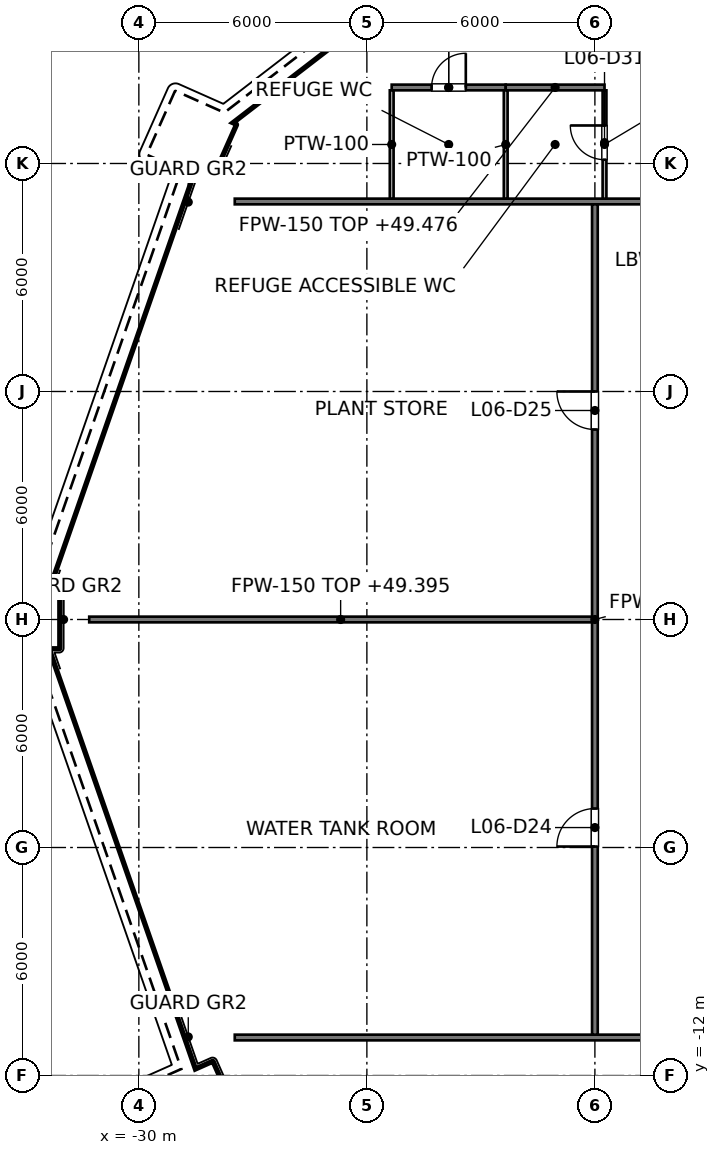
"""IFC4 building model, lengths in metres.
Left out: names, types, materials, properties, quantities, classifications, styles, units other than length and angle.
Written with IfcOpenShell. Run it as: python <this file> out.ifc"""

import sys

from ifc_helpers import new_model, si_unit, direction, frame, frame_2d, origin, place, context, subcontext, project, spatial, rectangle, extrude, element, fill, save


model = new_model("IFC4")
c1 = context("Model", 3, precision=1e-05, world=origin(), true_north=direction((0.0, 1.0)))
c2 = subcontext(c1, "Body", "Model", "MODEL_VIEW")
j1 = project(units=[si_unit("LENGTHUNIT", "METRE"), si_unit("PLANEANGLEUNIT", "RADIAN")], contexts=[c1])
p1 = place(None, origin())
s1 = spatial("IfcSite", under=j1, at=p1, CompositionType="ELEMENT")
p2 = place(p1, origin())
s2 = spatial("IfcBuilding", under=s1, at=p2, CompositionType="ELEMENT")
p3 = place(p2, frame((0.0, 0.0, 44.0)))
s3 = spatial("IfcBuildingStorey", under=s2, at=p3, CompositionType="ELEMENT", Elevation=44.0)
p4 = place(p3, frame((-27.476, 11.0, 0.0), z_axis=(0.0, 0.0, 1.0), x_axis=(1.0, 0.0, 0.0)))
e1 = element("IfcWall", 1, at=p4, inside=s3, PredefinedType="PARTITIONING", context=c2, shape_type="SweptSolid", body=[
    extrude(rectangle(XDim=54.953, YDim=0.15, at=frame_2d((27.476, 0.0))), origin(), (0.0, 0.0, 1.0), 5.327),
])
p5 = place(p4, frame((16.2, 0.0, 0.0)))
e2 = element("IfcOpeningElement", 2, at=p5, cuts=e1, PredefinedType="OPENING", context=c2, shape_type="SweptSolid", body=[
    extrude(rectangle(XDim=1.8, YDim=2.1, at=frame_2d((0.9, 1.05))), frame((0.0, 0.075, 0.0), z_axis=(0.0, -1.0, 0.0), x_axis=(1.0, 0.0, 0.0)), (0.0, 0.0, 1.0), 0.15),
])
p6 = place(p4, frame((23.8, 0.0, 0.0)))
e3 = element("IfcOpeningElement", 3, at=p6, cuts=e1, PredefinedType="OPENING", context=c2, shape_type="SweptSolid", body=[
    extrude(rectangle(XDim=1.8, YDim=2.1, at=frame_2d((0.9, 1.05))), frame((0.0, 0.075, 0.0), z_axis=(0.0, -1.0, 0.0), x_axis=(1.0, 0.0, 0.0)), (0.0, 0.0, 1.0), 0.15),
])
p7 = place(p4, frame((36.55, 0.0, 0.0)))
e4 = element("IfcOpeningElement", 4, at=p7, cuts=e1, PredefinedType="OPENING", context=c2, shape_type="SweptSolid", body=[
    extrude(rectangle(XDim=1.8, YDim=2.1, at=frame_2d((0.9, 1.05))), frame((0.0, 0.075, 0.0), z_axis=(0.0, -1.0, 0.0), x_axis=(1.0, 0.0, 0.0)), (0.0, 0.0, 1.0), 0.15),
])
p8 = place(p3, frame((-27.476, -11.0, 0.0), z_axis=(0.0, 0.0, 1.0), x_axis=(1.0, 0.0, 0.0)))
e5 = element("IfcWall", 5, at=p8, inside=s3, PredefinedType="PARTITIONING", context=c2, shape_type="SweptSolid", body=[
    extrude(rectangle(XDim=54.953, YDim=0.15, at=frame_2d((27.476, 0.0))), origin(), (0.0, 0.0, 1.0), 5.327),
])
p9 = place(p8, frame((27.9, 0.0, 0.0)))
e6 = element("IfcOpeningElement", 6, at=p9, cuts=e5, PredefinedType="OPENING", context=c2, shape_type="SweptSolid", body=[
    extrude(rectangle(XDim=1.0, YDim=2.1, at=frame_2d((0.5, 1.05))), frame((0.0, 0.075, 0.0), z_axis=(0.0, -1.0, 0.0), x_axis=(1.0, 0.0, 0.0)), (0.0, 0.0, 1.0), 0.15),
])
p10 = place(p8, frame((36.35, 0.0, 0.0)))
e7 = element("IfcOpeningElement", 7, at=p10, cuts=e5, PredefinedType="OPENING", context=c2, shape_type="SweptSolid", body=[
    extrude(rectangle(XDim=1.0, YDim=2.1, at=frame_2d((0.5, 1.05))), frame((0.0, 0.075, 0.0), z_axis=(0.0, -1.0, 0.0), x_axis=(1.0, 0.0, 0.0)), (0.0, 0.0, 1.0), 0.15),
])
p11 = place(p8, frame((43.55, 0.0, 0.0)))
e8 = element("IfcOpeningElement", 8, at=p11, cuts=e5, PredefinedType="OPENING", context=c2, shape_type="SweptSolid", body=[
    extrude(rectangle(XDim=1.0, YDim=2.1, at=frame_2d((0.5, 1.05))), frame((0.0, 0.075, 0.0), z_axis=(0.0, -1.0, 0.0), x_axis=(1.0, 0.0, 0.0)), (0.0, 0.0, 1.0), 0.15),
])
p12 = place(p8, frame((16.65, 0.0, 0.0)))
e9 = element("IfcOpeningElement", 9, at=p12, cuts=e5, PredefinedType="OPENING", context=c2, shape_type="SweptSolid", body=[
    extrude(rectangle(XDim=1.8, YDim=2.1, at=frame_2d((0.9, 1.05))), frame((0.0, 0.075, 0.0), z_axis=(0.0, -1.0, 0.0), x_axis=(1.0, 0.0, 0.0)), (0.0, 0.0, 1.0), 0.15),
])
p13 = place(p3, frame((-18.0, -10.925, 0.0), z_axis=(0.0, 0.0, 1.0), x_axis=(0.0, 1.0, 0.0)))
e10 = element("IfcWall", 10, at=p13, inside=s3, PredefinedType="PARTITIONING", context=c2, shape_type="SweptSolid", body=[
    extrude(rectangle(XDim=21.85, YDim=0.15, at=frame_2d((10.925, 0.0))), origin(), (0.0, 0.0, 1.0), 5.327),
])
p14 = place(p13, frame((4.95, 0.0, 0.0)))
e11 = element("IfcOpeningElement", 11, at=p14, cuts=e10, PredefinedType="OPENING", context=c2, shape_type="SweptSolid", body=[
    extrude(rectangle(XDim=1.0, YDim=2.1, at=frame_2d((0.5, 1.05))), frame((0.0, 0.075, 0.0), z_axis=(0.0, -1.0, 0.0), x_axis=(1.0, 0.0, 0.0)), (0.0, 0.0, 1.0), 0.15),
])
p15 = place(p13, frame((15.925, 0.0, 0.0)))
e12 = element("IfcOpeningElement", 12, at=p15, cuts=e10, PredefinedType="OPENING", context=c2, shape_type="SweptSolid", body=[
    extrude(rectangle(XDim=1.0, YDim=2.1, at=frame_2d((0.5, 1.05))), frame((0.0, 0.075, 0.0), z_axis=(0.0, -1.0, 0.0), x_axis=(1.0, 0.0, 0.0)), (0.0, 0.0, 1.0), 0.15),
])
p16 = place(p3, frame((-18.075, 0.0, 0.0), z_axis=(0.0, 0.0, 1.0), x_axis=(-1.0, 0.0, 0.0)))
e13 = element("IfcWall", 13, at=p16, inside=s3, PredefinedType="PARTITIONING", context=c2, shape_type="SweptSolid", body=[
    extrude(rectangle(XDim=13.231, YDim=0.15, at=frame_2d((6.615, 0.0))), origin(), (0.0, 0.0, 1.0), 5.395),
])
p17 = place(p3, frame((-23.347, 14.0, 0.0), z_axis=(0.0, 0.0, 1.0), x_axis=(1.0, 0.0, 0.0)))
e14 = element("IfcWall", 14, at=p17, inside=s3, PredefinedType="PARTITIONING", context=c2, shape_type="SweptSolid", body=[
    extrude(rectangle(XDim=3.0, YDim=0.15, at=frame_2d((1.5, 0.0))), origin(), (0.0, 0.0, 1.0), 6.25),
])
p18 = place(p17, frame((1.05, 0.0, 0.0)))
e15 = element("IfcOpeningElement", 15, at=p18, cuts=e14, PredefinedType="OPENING", context=c2, shape_type="SweptSolid", body=[
    extrude(rectangle(XDim=0.9, YDim=2.1, at=frame_2d((0.45, 1.05))), frame((0.0, 0.075, 0.0), z_axis=(0.0, -1.0, 0.0), x_axis=(1.0, 0.0, 0.0)), (0.0, 0.0, 1.0), 0.15),
])
p19 = place(p3, frame((-20.347, 14.0, 0.0), z_axis=(0.0, 0.0, 1.0), x_axis=(1.0, 0.0, 0.0)))
e16 = element("IfcWall", 16, at=p19, inside=s3, PredefinedType="PARTITIONING", context=c2, shape_type="SweptSolid", body=[
    extrude(rectangle(XDim=2.6, YDim=0.15, at=frame_2d((1.3, 0.0))), origin(), (0.0, 0.0, 1.0), 5.476),
])
for number, where, z_axis, x_axis in (
    (17, (-23.347, 11.075, 0.0), (0.0, 0.0, 1.0), (0.0, 1.0, 0.0)),
    (18, (-20.347, 11.075, 0.0), (0.0, 0.0, 1.0), (0.0, 1.0, 0.0)),
):
    element("IfcWall", number, at=place(p3, frame(where, z_axis=z_axis, x_axis=x_axis)), inside=s3, PredefinedType="PARTITIONING", context=c2, shape_type="SweptSolid", body=[
        extrude(rectangle(XDim=2.85, YDim=0.1, at=frame_2d((1.425, 0.0))), origin(), (0.0, 0.0, 1.0), 5.627),
    ])
p20 = place(p3, frame((-17.747, 11.075, 0.0), z_axis=(0.0, 0.0, 1.0), x_axis=(0.0, 1.0, 0.0)))
e19 = element("IfcWall", 19, at=p20, inside=s3, PredefinedType="PARTITIONING", context=c2, shape_type="SweptSolid", body=[
    extrude(rectangle(XDim=2.85, YDim=0.1, at=frame_2d((1.425, 0.0))), origin(), (0.0, 0.0, 1.0), 5.476),
])
p21 = place(p20, frame((1.025, 0.0, 0.0)))
e20 = element("IfcOpeningElement", 20, at=p21, cuts=e19, PredefinedType="OPENING", context=c2, shape_type="SweptSolid", body=[
    extrude(rectangle(XDim=0.9, YDim=2.1, at=frame_2d((0.45, 1.05))), frame((0.0, 0.05, 0.0), z_axis=(0.0, -1.0, 0.0), x_axis=(1.0, 0.0, 0.0)), (0.0, 0.0, 1.0), 0.1),
])
p22 = place(p14, origin())
e21 = element("IfcDoor", 21, at=p22, inside=s3, OperationType="SINGLE_SWING_LEFT", PredefinedType="DOOR", context=c2, shape_type="SweptSolid", body=[
    extrude(rectangle(XDim=1.0, YDim=2.1, at=frame_2d((0.5, 1.05))), frame((0.0, 0.025, 0.0), z_axis=(0.0, -1.0, 0.0), x_axis=(1.0, 0.0, 0.0)), (0.0, 0.0, 1.0), 0.05),
])
fill(e11, e21)
p23 = place(p15, origin())
e22 = element("IfcDoor", 22, at=p23, inside=s3, OperationType="SINGLE_SWING_RIGHT", PredefinedType="DOOR", context=c2, shape_type="SweptSolid", body=[
    extrude(rectangle(XDim=1.0, YDim=2.1, at=frame_2d((0.5, 1.05))), frame((0.0, 0.025, 0.0), z_axis=(0.0, -1.0, 0.0), x_axis=(1.0, 0.0, 0.0)), (0.0, 0.0, 1.0), 0.05),
])
fill(e12, e22)
p24 = place(p18, origin())
e23 = element("IfcDoor", 23, at=p24, inside=s3, OperationType="SINGLE_SWING_RIGHT", PredefinedType="DOOR", context=c2, shape_type="SweptSolid", body=[
    extrude(rectangle(XDim=0.9, YDim=2.1, at=frame_2d((0.45, 1.05))), frame((0.0, 0.025, 0.0), z_axis=(0.0, -1.0, 0.0), x_axis=(1.0, 0.0, 0.0)), (0.0, 0.0, 1.0), 0.05),
])
fill(e15, e23)
p25 = place(p21, origin())
e24 = element("IfcDoor", 24, at=p25, inside=s3, OperationType="SINGLE_SWING_RIGHT", PredefinedType="DOOR", context=c2, shape_type="SweptSolid", body=[
    extrude(rectangle(XDim=0.9, YDim=2.1, at=frame_2d((0.45, 1.05))), frame((0.0, 0.025, 0.0), z_axis=(0.0, -1.0, 0.0), x_axis=(1.0, 0.0, 0.0)), (0.0, 0.0, 1.0), 0.05),
])
fill(e20, e24)
save(model, sys.argv[1])
